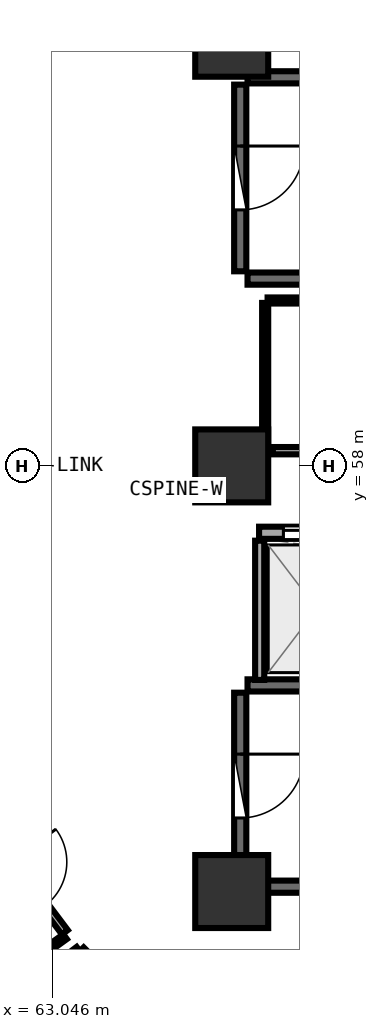
"""IFC4 building model, lengths in metres.
Left out: names, types, materials, properties, quantities, classifications, styles, units other than length and angle.
Written with IfcOpenShell. Run it as: python <this file> out.ifc"""

import sys

from ifc_helpers import new_model, si_unit, direction, frame, frame_2d, origin, origin_2d, place, context, subcontext, project, spatial, rectangle, extrude, element, fill, save


model = new_model("IFC4")
c1 = context("Model", 3, precision=1e-05, world=origin(), true_north=direction((0.0, 1.0)))
c2 = subcontext(c1, "Body", "Model", "MODEL_VIEW")
j1 = project(units=[si_unit("LENGTHUNIT", "METRE"), si_unit("PLANEANGLEUNIT", "RADIAN")], contexts=[c1])
p1 = place(None, origin())
s1 = spatial("IfcSite", under=j1, at=p1, CompositionType="ELEMENT")
p2 = place(p1, origin())
s2 = spatial("IfcBuilding", under=s1, at=p2, CompositionType="ELEMENT")
p3 = place(p2, frame((0.0, 0.0, 215.7)))
s3 = spatial("IfcBuildingStorey", under=s2, at=p3, CompositionType="ELEMENT", Elevation=215.7)
for number, where, z_axis, x_axis in (
    (1, (66.0, 51.0, 0.0), (0.0, 0.0, 1.0), (1.0, 0.0, 0.0)),
    (2, (66.0, 65.0, 0.0), (0.0, 0.0, 1.0), (1.0, 0.0, 0.0)),
    (3, (66.0, 58.0, 0.0), (0.0, 0.0, 1.0), (1.0, 0.0, 0.0)),
):
    element("IfcColumn", number, at=place(p3, frame(where, z_axis=z_axis, x_axis=x_axis)), inside=s3, PredefinedType="PILASTER", context=c2, shape_type="SweptSolid", body=[
        extrude(rectangle(XDim=1.2, YDim=1.2, at=origin_2d()), origin(), (0.0, 0.0, 1.0), 3.75),
    ])
for number, where, z_axis, x_axis in (
    (4, (66.26, 61.08, 0.0), (0.0, 0.0, 1.0), (1.0, 0.0, 0.0)),
    (5, (73.42, 64.39, 0.0), (0.0, 0.0, 1.0), (-1.0, 0.0, 0.0)),
):
    element("IfcWall", number, at=place(p3, frame(where, z_axis=z_axis, x_axis=x_axis)), inside=s3, PredefinedType="SHEAR", context=c2, shape_type="SweptSolid", body=[
        extrude(rectangle(XDim=7.16, YDim=0.2, at=frame_2d((3.58, 0.0))), origin(), (0.0, 0.0, 1.0), 3.49),
    ])
p4 = place(p3, frame((66.14, 64.27, 0.0), z_axis=(0.0, 0.0, 1.0), x_axis=(0.0, -1.0, 0.0)))
e6 = element("IfcWall", 6, at=p4, inside=s3, PredefinedType="SHEAR", context=c2, shape_type="SweptSolid", body=[
    extrude(rectangle(XDim=3.07, YDim=0.2, at=frame_2d((1.535, 0.0))), origin(), (0.0, 0.0, 1.0), 3.49),
])
p5 = place(p4, frame((1.01, 0.0, 0.0)))
e7 = element("IfcOpeningElement", 7, at=p5, cuts=e6, PredefinedType="OPENING", context=c2, shape_type="SweptSolid", body=[
    extrude(rectangle(XDim=1.05, YDim=2.1, at=frame_2d((0.525, 1.05))), frame((0.0, 0.11, 0.0), z_axis=(0.0, -1.0, 0.0), x_axis=(1.0, 0.0, 0.0)), (0.0, 0.0, 1.0), 0.22),
])
for number, where, z_axis, x_axis in (
    (8, (66.26, 51.08, 0.0), (0.0, 0.0, 1.0), (1.0, 0.0, 0.0)),
    (9, (73.42, 54.39, 0.0), (0.0, 0.0, 1.0), (-1.0, 0.0, 0.0)),
):
    element("IfcWall", number, at=place(p3, frame(where, z_axis=z_axis, x_axis=x_axis)), inside=s3, PredefinedType="SHEAR", context=c2, shape_type="SweptSolid", body=[
        extrude(rectangle(XDim=7.16, YDim=0.2, at=frame_2d((3.58, 0.0))), origin(), (0.0, 0.0, 1.0), 3.49),
    ])
p6 = place(p3, frame((66.14, 54.27, 0.0), z_axis=(0.0, 0.0, 1.0), x_axis=(0.0, -1.0, 0.0)))
e10 = element("IfcWall", 10, at=p6, inside=s3, PredefinedType="SHEAR", context=c2, shape_type="SweptSolid", body=[
    extrude(rectangle(XDim=3.07, YDim=0.2, at=frame_2d((1.535, 0.0))), origin(), (0.0, 0.0, 1.0), 3.49),
])
p7 = place(p6, frame((1.01, 0.0, 0.0)))
e11 = element("IfcOpeningElement", 11, at=p7, cuts=e10, PredefinedType="OPENING", context=c2, shape_type="SweptSolid", body=[
    extrude(rectangle(XDim=1.05, YDim=2.1, at=frame_2d((0.525, 1.05))), frame((0.0, 0.11, 0.0), z_axis=(0.0, -1.0, 0.0), x_axis=(1.0, 0.0, 0.0)), (0.0, 0.0, 1.0), 0.22),
])
p8 = place(p3, frame((66.45, 56.9, 0.0), z_axis=(0.0, 0.0, 1.0), x_axis=(1.0, 0.0, 0.0)))
e12 = element("IfcWall", 12, at=p8, inside=s3, PredefinedType="SOLIDWALL", context=c2, shape_type="SweptSolid", body=[
    extrude(rectangle(XDim=14.4, YDim=0.2, at=frame_2d((7.2, 0.0))), origin(), (0.0, 0.0, 1.0), 3.48),
])
p9 = place(p8, frame((0.4, 0.0, 0.0)))
e13 = element("IfcOpeningElement", 13, at=p9, cuts=e12, PredefinedType="OPENING", context=c2, shape_type="SweptSolid", body=[
    extrude(rectangle(XDim=1.1, YDim=2.1, at=frame_2d((0.55, 1.05))), frame((0.0, 0.11, 0.0), z_axis=(0.0, -1.0, 0.0), x_axis=(1.0, 0.0, 0.0)), (0.0, 0.0, 1.0), 0.22),
])
p10 = place(p8, frame((2.4, 0.0, 0.0)))
e14 = element("IfcOpeningElement", 14, at=p10, cuts=e12, PredefinedType="OPENING", context=c2, shape_type="SweptSolid", body=[
    extrude(rectangle(XDim=1.1, YDim=2.1, at=frame_2d((0.55, 1.05))), frame((0.0, 0.11, 0.0), z_axis=(0.0, -1.0, 0.0), x_axis=(1.0, 0.0, 0.0)), (0.0, 0.0, 1.0), 0.22),
])
p11 = place(p8, frame((4.4, 0.0, 0.0)))
e15 = element("IfcOpeningElement", 15, at=p11, cuts=e12, PredefinedType="OPENING", context=c2, shape_type="SweptSolid", body=[
    extrude(rectangle(XDim=1.1, YDim=2.1, at=frame_2d((0.55, 1.05))), frame((0.0, 0.11, 0.0), z_axis=(0.0, -1.0, 0.0), x_axis=(1.0, 0.0, 0.0)), (0.0, 0.0, 1.0), 0.22),
])
p12 = place(p3, frame((66.46, 54.48, 0.0), z_axis=(0.0, 0.0, 1.0), x_axis=(0.0, 1.0, 0.0)))
e16 = element("IfcWall", 16, at=p12, inside=s3, PredefinedType="PARTITIONING", context=c2, shape_type="SweptSolid", body=[
    extrude(rectangle(XDim=2.29, YDim=0.15, at=frame_2d((1.145, 0.0))), origin(), (0.0, 0.0, 1.0), 3.48),
])
p13 = place(p3, frame((66.675, 58.25, 0.0), z_axis=(0.0, 0.0, 1.0), x_axis=(1.0, 0.0, 0.0)))
e17 = element("IfcWall", 17, at=p13, inside=s3, PredefinedType="PARTITIONING", context=c2, shape_type="SweptSolid", body=[
    extrude(rectangle(XDim=3.265, YDim=0.12, at=frame_2d((1.632, 0.0))), origin(), (0.0, 0.0, 1.0), 3.48),
])
p14 = place(p13, frame((1.182, 0.0, 0.0)))
e18 = element("IfcOpeningElement", 18, at=p14, cuts=e17, PredefinedType="OPENING", context=c2, shape_type="SweptSolid", body=[
    extrude(rectangle(XDim=0.9, YDim=2.08, at=frame_2d((0.45, 1.04))), frame((0.0, 0.07, 0.0), z_axis=(0.0, -1.0, 0.0), x_axis=(1.0, 0.0, 0.0)), (0.0, 0.0, 1.0), 0.14),
])
p15 = place(p3, frame((62.06, 51.922, 0.0), z_axis=(0.0, 0.0, 1.0), x_axis=(0.600647163637, -0.799514218019, 0.0)))
e19 = element("IfcWall", 19, at=p15, inside=s3, PredefinedType="PARTITIONING", context=c2, shape_type="SweptSolid", body=[
    extrude(rectangle(XDim=1.991, YDim=0.12, at=frame_2d((0.996, 0.0))), origin(), (0.0, 0.0, 1.0), 3.025),
])
p16 = place(p15, frame((0.546, 0.0, 0.0)))
e20 = element("IfcOpeningElement", 20, at=p16, cuts=e19, PredefinedType="OPENING", context=c2, shape_type="SweptSolid", body=[
    extrude(rectangle(XDim=0.9, YDim=2.08, at=frame_2d((0.45, 1.04))), frame((0.0, 0.07, 0.0), z_axis=(0.0, -1.0, 0.0), x_axis=(1.0, 0.0, 0.0)), (0.0, 0.0, 1.0), 0.14),
])
p17 = place(p3, frame((69.96, 60.72, 0.0), z_axis=(0.0, 0.0, 1.0), x_axis=(-1.0, 0.0, 0.0)))
e21 = element("IfcWall", 21, at=p17, inside=s3, PredefinedType="PARTITIONING", context=c2, shape_type="SweptSolid", body=[
    extrude(rectangle(XDim=3.37, YDim=0.1, at=frame_2d((1.685, 0.0))), origin(), (0.0, 0.0, 1.0), 3.48),
])
p18 = place(p3, frame((66.55, 60.68, 0.0), z_axis=(0.0, 0.0, 1.0), x_axis=(0.0, -1.0, 0.0)))
e22 = element("IfcWall", 22, at=p18, inside=s3, PredefinedType="PARTITIONING", context=c2, shape_type="SweptSolid", body=[
    extrude(rectangle(XDim=2.383, YDim=0.1, at=frame_2d((1.191, 0.0))), origin(), (0.0, 0.0, 1.0), 3.48),
])
p19 = place(p3, frame((63.26, 50.259, 0.0), z_axis=(0.0, 0.0, 1.0), x_axis=(-0.810850730514, -0.585253016076, 0.0)))
e23 = element("IfcWall", 23, at=p19, inside=s3, PredefinedType="PARTITIONING", context=c2, shape_type="SweptSolid", body=[
    extrude(rectangle(XDim=6.793, YDim=0.1, at=frame_2d((3.396, 0.0))), origin(), (0.0, 0.0, 1.0), 3.175),
])
p20 = place(p3, frame((63.519, 50.036, 0.0), z_axis=(0.0, 0.0, 1.0), x_axis=(0.708179895313, -0.706032036012, 0.0)))
e24 = element("IfcWall", 24, at=p20, inside=s3, PredefinedType="PLUMBINGWALL", context=c2, shape_type="SweptSolid", body=[
    extrude(rectangle(XDim=0.796, YDim=0.13, at=frame_2d((0.398, 0.0))), origin(), (0.0, 0.0, 1.0), 3.025),
])
p21 = place(p3, frame((60.575, 47.828, 0.0), z_axis=(0.0, 0.0, 1.0), x_axis=(0.79681650582, 0.604221363453, 0.0)))
e25 = element("IfcWall", 25, at=p21, inside=s3, PredefinedType="PLUMBINGWALL", context=c2, shape_type="SweptSolid", body=[
    extrude(rectangle(XDim=3.657, YDim=0.13, at=frame_2d((1.829, 0.0))), origin(), (0.0, 0.0, 1.0), 3.175),
])
p22 = place(p5, origin())
e26 = element("IfcDoor", 26, at=p22, inside=s3, OperationType="SINGLE_SWING_LEFT", PredefinedType="DOOR", context=c2, shape_type="SweptSolid", body=[
    extrude(rectangle(XDim=1.05, YDim=2.1, at=frame_2d((0.525, 1.05))), frame((0.0, 0.025, 0.0), z_axis=(0.0, -1.0, 0.0), x_axis=(1.0, 0.0, 0.0)), (0.0, 0.0, 1.0), 0.05),
])
fill(e7, e26)
p23 = place(p7, origin())
e27 = element("IfcDoor", 27, at=p23, inside=s3, OperationType="SINGLE_SWING_LEFT", PredefinedType="DOOR", context=c2, shape_type="SweptSolid", body=[
    extrude(rectangle(XDim=1.05, YDim=2.1, at=frame_2d((0.525, 1.05))), frame((0.0, 0.025, 0.0), z_axis=(0.0, -1.0, 0.0), x_axis=(1.0, 0.0, 0.0)), (0.0, 0.0, 1.0), 0.05),
])
fill(e11, e27)
p24 = place(p9, origin())
e28 = element("IfcDoor", 28, at=p24, inside=s3, OperationType="DOUBLE_DOOR_SLIDING", PredefinedType="DOOR", context=c2, shape_type="SweptSolid", body=[
    extrude(rectangle(XDim=1.1, YDim=2.1, at=frame_2d((0.55, 1.05))), frame((0.0, 0.025, 0.0), z_axis=(0.0, -1.0, 0.0), x_axis=(1.0, 0.0, 0.0)), (0.0, 0.0, 1.0), 0.05),
])
fill(e13, e28)
save(model, sys.argv[1])
